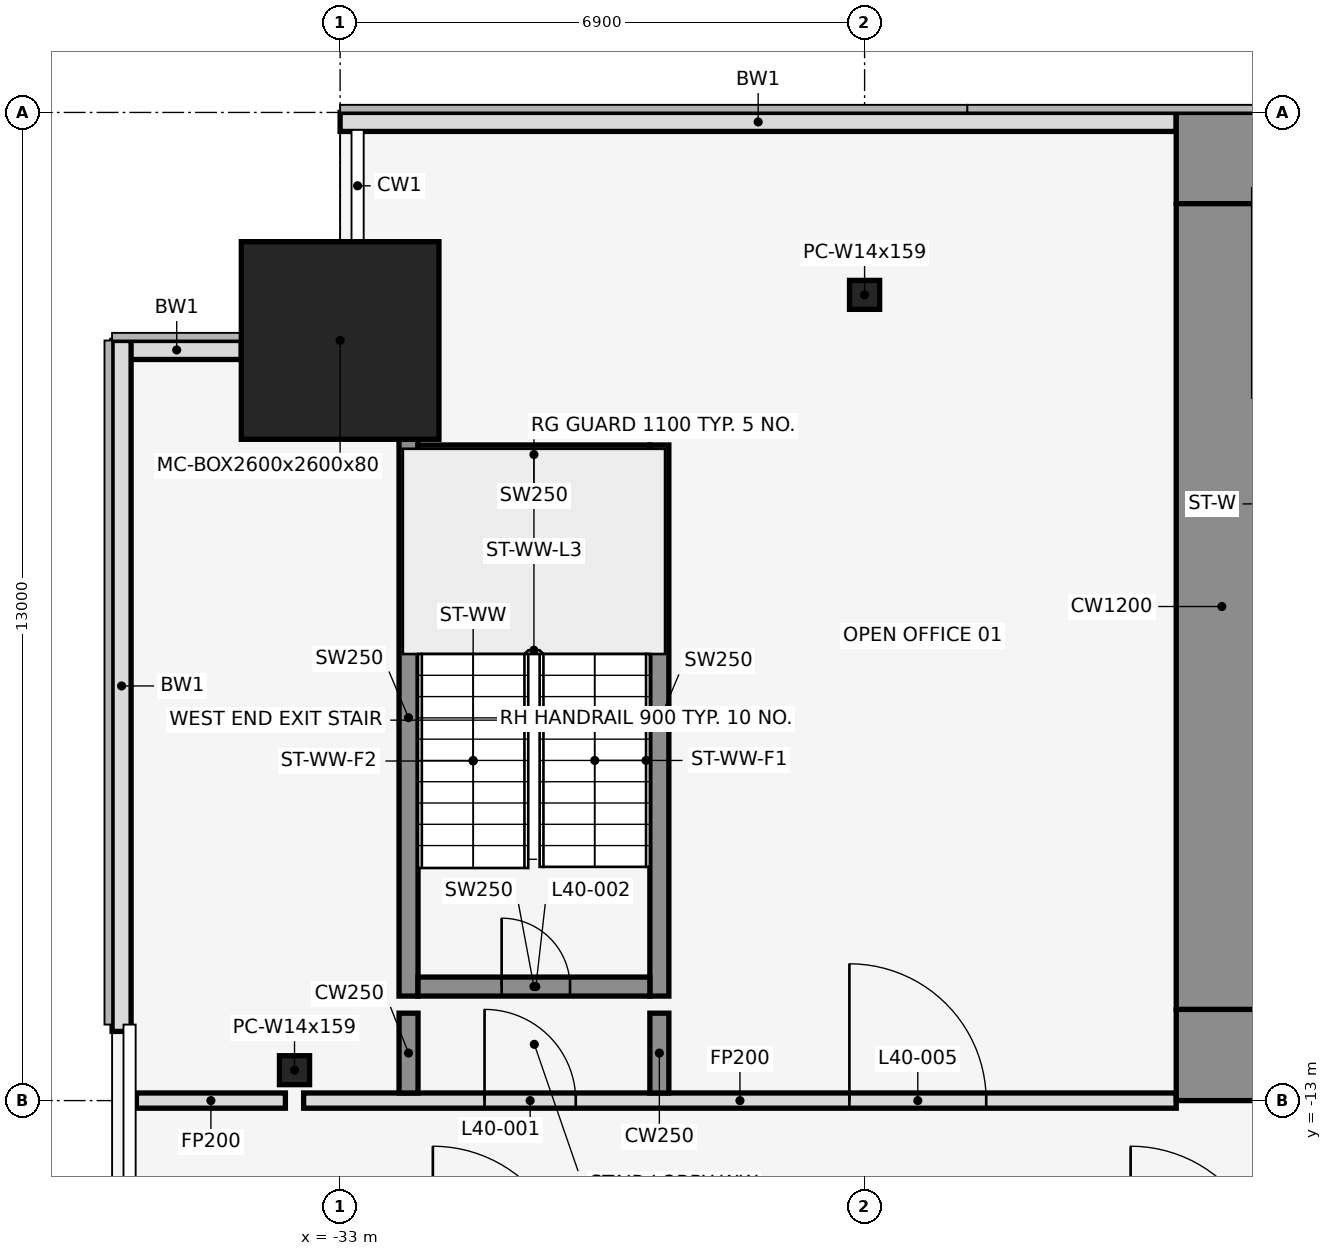
"""IFC4 building model, lengths in metres.
Left out: names, types, materials, properties, quantities, classifications, styles, units other than length and angle.
Written with IfcOpenShell. Run it as: python <this file> out.ifc"""

import sys

from ifc_helpers import new_model, si_unit, direction, frame, frame_2d, origin, origin_2d, place, context, subcontext, project, spatial, rectangle, hollow_rectangle, i_section, extrude, element, fill, save


model = new_model("IFC4")
c1 = context("Model", 3, precision=1e-05, world=origin(), true_north=direction((0.0, 1.0)))
c2 = subcontext(c1, "Body", "Model", "MODEL_VIEW")
j1 = project(units=[si_unit("LENGTHUNIT", "METRE"), si_unit("PLANEANGLEUNIT", "RADIAN")], contexts=[c1])
p1 = place(None, origin())
s1 = spatial("IfcSite", under=j1, at=p1, CompositionType="ELEMENT")
p2 = place(p1, origin())
s2 = spatial("IfcBuilding", under=s1, at=p2, CompositionType="ELEMENT")
p3 = place(p2, frame((0.0, 0.0, 181.4)))
s3 = spatial("IfcBuildingStorey", under=s2, at=p3, CompositionType="ELEMENT", Elevation=181.4)
p4 = place(p3, frame((-33.0, -3.0, 0.0), z_axis=(0.0, 0.0, 1.0), x_axis=(1.0, 0.0, 0.0)))
e1 = element("IfcColumn", 1, at=p4, inside=s3, PredefinedType="COLUMN", context=c2, shape_type="SweptSolid", body=[
    extrude(hollow_rectangle(XDim=2.6, YDim=2.6, WallThickness=0.08, at=origin_2d()), origin(), (0.0, 0.0, 1.0), 4.1),
])
for number, where, z_axis, x_axis in (
    (2, (-26.1, -2.4, 0.0), (0.0, 0.0, 1.0), (1.0, 0.0, 0.0)),
    (3, (-33.6, -12.6, 0.0), (0.0, 0.0, 1.0), (1.0, 0.0, 0.0)),
):
    element("IfcColumn", number, at=place(p3, frame(where, z_axis=z_axis, x_axis=x_axis)), inside=s3, PredefinedType="COLUMN", context=c2, shape_type="SweptSolid", body=[
        extrude(i_section(OverallWidth=0.396, OverallDepth=0.381, WebThickness=0.019, FlangeThickness=0.03, at=origin_2d()), origin(), (0.0, 0.0, 1.0), 4.1),
    ])
p5 = place(p3, frame((-22.0, -0.125, 0.0), z_axis=(0.0, 0.0, 1.0), x_axis=(-1.0, 0.0, 0.0)))
e4 = element("IfcWall", 4, at=p5, inside=s3, PredefinedType="STANDARD", context=c2, shape_type="SweptSolid", body=[
    extrude(rectangle(XDim=11.0, YDim=0.25, at=frame_2d((5.5, 0.0))), origin(), (0.0, 0.0, 1.0), 3.9),
])
p6 = place(p3, frame((-34.3, -3.125, 0.0), z_axis=(0.0, 0.0, 1.0), x_axis=(-1.0, 0.0, 0.0)))
e5 = element("IfcWall", 5, at=p6, inside=s3, PredefinedType="STANDARD", context=c2, shape_type="SweptSolid", body=[
    extrude(rectangle(XDim=1.7, YDim=0.25, at=frame_2d((0.85, 0.0))), origin(), (0.0, 0.0, 1.0), 3.9),
])
p7 = place(p3, frame((-35.875, -3.0, 0.0), z_axis=(0.0, 0.0, 1.0), x_axis=(0.0, -1.0, 0.0)))
e6 = element("IfcWall", 6, at=p7, inside=s3, PredefinedType="STANDARD", context=c2, shape_type="SweptSolid", body=[
    extrude(rectangle(XDim=9.09, YDim=0.25, at=frame_2d((4.545, 0.0))), origin(), (0.0, 0.0, 1.0), 3.9),
])
p8 = place(p3, frame((-32.1, -11.625, 0.0), z_axis=(0.0, 0.0, 1.0), x_axis=(0.0, 1.0, 0.0)))
e7 = element("IfcWall", 7, at=p8, inside=s3, PredefinedType="SHEAR", context=c2, shape_type="SweptSolid", body=[
    extrude(rectangle(XDim=7.325, YDim=0.25, at=frame_2d((3.663, 0.0))), origin(), (0.0, 0.0, 1.0), 4.1),
])
p9 = place(p3, frame((-28.8, -11.625, 0.0), z_axis=(0.0, 0.0, 1.0), x_axis=(0.0, 1.0, 0.0)))
e8 = element("IfcWall", 8, at=p9, inside=s3, PredefinedType="SHEAR", context=c2, shape_type="SweptSolid", body=[
    extrude(rectangle(XDim=7.25, YDim=0.25, at=frame_2d((3.625, 0.0))), origin(), (0.0, 0.0, 1.0), 4.1),
])
p10 = place(p3, frame((-31.975, -11.5, 0.0), z_axis=(0.0, 0.0, 1.0), x_axis=(1.0, 0.0, 0.0)))
e9 = element("IfcWall", 9, at=p10, inside=s3, PredefinedType="SHEAR", context=c2, shape_type="SweptSolid", body=[
    extrude(rectangle(XDim=3.05, YDim=0.25, at=frame_2d((1.525, 0.0))), origin(), (0.0, 0.0, 1.0), 4.1),
])
p11 = place(p10, frame((1.1, 0.0, 0.0)))
e10 = element("IfcOpeningElement", 10, at=p11, cuts=e9, PredefinedType="OPENING", context=c2, shape_type="SweptSolid", body=[
    extrude(rectangle(XDim=0.9, YDim=2.1, at=frame_2d((0.45, 1.05))), frame((0.0, 0.137, 0.0), z_axis=(0.0, -1.0, 0.0), x_axis=(1.0, 0.0, 0.0)), (0.0, 0.0, 1.0), 0.274),
])
p12 = place(p3, frame((-31.975, -4.5, 0.0), z_axis=(0.0, 0.0, 1.0), x_axis=(1.0, 0.0, 0.0)))
e11 = element("IfcWall", 11, at=p12, inside=s3, PredefinedType="SHEAR", context=c2, shape_type="SweptSolid", body=[
    extrude(rectangle(XDim=3.05, YDim=0.25, at=frame_2d((1.525, 0.0))), origin(), (0.0, 0.0, 1.0), 4.1),
])
p13 = place(p3, frame((-35.68, -13.0, 0.0), z_axis=(0.0, 0.0, 1.0), x_axis=(1.0, 0.0, 0.0)))
e12 = element("IfcWall", 12, at=p13, inside=s3, PredefinedType="PARTITIONING", context=c2, shape_type="SweptSolid", body=[
    extrude(rectangle(XDim=1.96, YDim=0.2, at=frame_2d((0.98, 0.0))), origin(), (0.0, 0.0, 1.0), 2.79),
])
p14 = place(p3, frame((-33.48, -13.0, 0.0), z_axis=(0.0, 0.0, 1.0), x_axis=(1.0, 0.0, 0.0)))
e13 = element("IfcWall", 13, at=p14, inside=s3, PredefinedType="PARTITIONING", context=c2, shape_type="SweptSolid", body=[
    extrude(rectangle(XDim=11.48, YDim=0.2, at=frame_2d((5.74, 0.0))), origin(), (0.0, 0.0, 1.0), 2.79),
])
p15 = place(p14, frame((2.38, 0.0, 0.0)))
e14 = element("IfcOpeningElement", 14, at=p15, cuts=e13, PredefinedType="OPENING", context=c2, shape_type="SweptSolid", body=[
    extrude(rectangle(XDim=1.2, YDim=2.1, at=frame_2d((0.6, 1.05))), frame((0.0, 0.112, 0.0), z_axis=(0.0, -1.0, 0.0), x_axis=(1.0, 0.0, 0.0)), (0.0, 0.0, 1.0), 0.224),
])
p16 = place(p14, frame((7.18, 0.0, 0.0)))
e15 = element("IfcOpeningElement", 15, at=p16, cuts=e13, PredefinedType="OPENING", context=c2, shape_type="SweptSolid", body=[
    extrude(rectangle(XDim=1.8, YDim=2.1, at=frame_2d((0.9, 1.05))), frame((0.0, 0.112, 0.0), z_axis=(0.0, -1.0, 0.0), x_axis=(1.0, 0.0, 0.0)), (0.0, 0.0, 1.0), 0.224),
])
for number, where, z_axis, x_axis in (
    (16, (-32.1, -12.9, 0.0), (0.0, 0.0, 1.0), (0.0, 1.0, 0.0)),
    (17, (-28.8, -12.9, 0.0), (0.0, 0.0, 1.0), (0.0, 1.0, 0.0)),
):
    element("IfcWall", number, at=place(p3, frame(where, z_axis=z_axis, x_axis=x_axis)), inside=s3, PredefinedType="SHEAR", context=c2, shape_type="SweptSolid", body=[
        extrude(rectangle(XDim=1.05, YDim=0.25, at=frame_2d((0.525, 0.0))), origin(), (0.0, 0.0, 1.0), 4.1),
    ])
p17 = place(p3, frame((-22.0, -0.6, 0.0), z_axis=(0.0, 0.0, 1.0), x_axis=(1.0, 0.0, 0.0)))
e18 = element("IfcWall", 18, at=p17, inside=s3, PredefinedType="SHEAR", context=c2, shape_type="SweptSolid", body=[
    extrude(rectangle(XDim=44.0, YDim=1.2, at=frame_2d((22.0, 0.0))), origin(), (0.0, 0.0, 1.0), 4.1),
])
p18 = place(p17, frame((18.55, 0.0, 0.0)))
e19 = element("IfcOpeningElement", 19, at=p18, cuts=e18, PredefinedType="OPENING", context=c2, shape_type="SweptSolid", body=[
    extrude(rectangle(XDim=0.9, YDim=2.1, at=frame_2d((0.45, 1.05))), frame((0.0, 0.612, 0.0), z_axis=(0.0, -1.0, 0.0), x_axis=(1.0, 0.0, 0.0)), (0.0, 0.0, 1.0), 1.224),
])
p19 = place(p17, frame((24.55, 0.0, 0.0)))
e20 = element("IfcOpeningElement", 20, at=p19, cuts=e18, PredefinedType="OPENING", context=c2, shape_type="SweptSolid", body=[
    extrude(rectangle(XDim=0.9, YDim=2.1, at=frame_2d((0.45, 1.05))), frame((0.0, 0.612, 0.0), z_axis=(0.0, -1.0, 0.0), x_axis=(1.0, 0.0, 0.0)), (0.0, 0.0, 1.0), 1.224),
])
p20 = place(p3, frame((-22.0, -12.4, 0.0), z_axis=(0.0, 0.0, 1.0), x_axis=(1.0, 0.0, 0.0)))
e21 = element("IfcWall", 21, at=p20, inside=s3, PredefinedType="SHEAR", context=c2, shape_type="SweptSolid", body=[
    extrude(rectangle(XDim=44.0, YDim=1.2, at=frame_2d((22.0, 0.0))), origin(), (0.0, 0.0, 1.0), 4.1),
])
p21 = place(p20, frame((2.2, 0.0, 0.0)))
e22 = element("IfcOpeningElement", 22, at=p21, cuts=e21, PredefinedType="OPENING", context=c2, shape_type="SweptSolid", body=[
    extrude(rectangle(XDim=1.2, YDim=2.1, at=frame_2d((0.6, 1.05))), frame((0.0, 0.612, 0.0), z_axis=(0.0, -1.0, 0.0), x_axis=(1.0, 0.0, 0.0)), (0.0, 0.0, 1.0), 1.224),
])
p22 = place(p20, frame((21.4, 0.0, 0.0)))
e23 = element("IfcOpeningElement", 23, at=p22, cuts=e21, PredefinedType="OPENING", context=c2, shape_type="SweptSolid", body=[
    extrude(rectangle(XDim=1.2, YDim=2.1, at=frame_2d((0.6, 1.05))), frame((0.0, 0.612, 0.0), z_axis=(0.0, -1.0, 0.0), x_axis=(1.0, 0.0, 0.0)), (0.0, 0.0, 1.0), 1.224),
])
p23 = place(p20, frame((40.6, 0.0, 0.0)))
e24 = element("IfcOpeningElement", 24, at=p23, cuts=e21, PredefinedType="OPENING", context=c2, shape_type="SweptSolid", body=[
    extrude(rectangle(XDim=1.2, YDim=2.1, at=frame_2d((0.6, 1.05))), frame((0.0, 0.612, 0.0), z_axis=(0.0, -1.0, 0.0), x_axis=(1.0, 0.0, 0.0)), (0.0, 0.0, 1.0), 1.224),
])
p24 = place(p20, frame((16.0, 0.0, 0.0)))
e25 = element("IfcOpeningElement", 25, at=p24, cuts=e21, PredefinedType="OPENING", context=c2, shape_type="SweptSolid", body=[
    extrude(rectangle(XDim=1.8, YDim=2.1, at=frame_2d((0.9, 1.05))), frame((0.0, 0.612, 0.0), z_axis=(0.0, -1.0, 0.0), x_axis=(1.0, 0.0, 0.0)), (0.0, 0.0, 1.0), 1.224),
])
p25 = place(p20, frame((6.3, 0.0, 0.0)))
e26 = element("IfcOpeningElement", 26, at=p25, cuts=e21, PredefinedType="OPENING", context=c2, shape_type="SweptSolid", body=[
    extrude(rectangle(XDim=1.2, YDim=2.1, at=frame_2d((0.6, 1.05))), frame((0.0, 0.612, 0.0), z_axis=(0.0, -1.0, 0.0), x_axis=(1.0, 0.0, 0.0)), (0.0, 0.0, 1.0), 1.224),
])
p26 = place(p20, frame((26.2, 0.0, 0.0)))
e27 = element("IfcOpeningElement", 27, at=p26, cuts=e21, PredefinedType="OPENING", context=c2, shape_type="SweptSolid", body=[
    extrude(rectangle(XDim=1.8, YDim=2.1, at=frame_2d((0.9, 1.05))), frame((0.0, 0.612, 0.0), z_axis=(0.0, -1.0, 0.0), x_axis=(1.0, 0.0, 0.0)), (0.0, 0.0, 1.0), 1.224),
])
p27 = place(p20, frame((36.5, 0.0, 0.0)))
e28 = element("IfcOpeningElement", 28, at=p27, cuts=e21, PredefinedType="OPENING", context=c2, shape_type="SweptSolid", body=[
    extrude(rectangle(XDim=1.2, YDim=2.1, at=frame_2d((0.6, 1.05))), frame((0.0, 0.612, 0.0), z_axis=(0.0, -1.0, 0.0), x_axis=(1.0, 0.0, 0.0)), (0.0, 0.0, 1.0), 1.224),
])
p28 = place(p3, frame((-21.4, -11.8, 0.0), z_axis=(0.0, 0.0, 1.0), x_axis=(0.0, 1.0, 0.0)))
e29 = element("IfcWall", 29, at=p28, inside=s3, PredefinedType="SHEAR", context=c2, shape_type="SweptSolid", body=[
    extrude(rectangle(XDim=10.6, YDim=1.2, at=frame_2d((5.3, 0.0))), origin(), (0.0, 0.0, 1.0), 4.1),
])
p29 = place(p15, origin())
e30 = element("IfcDoor", 30, at=p29, inside=s3, OperationType="SINGLE_SWING_LEFT", PredefinedType="DOOR", context=c2, shape_type="SweptSolid", body=[
    extrude(rectangle(XDim=1.2, YDim=2.1, at=frame_2d((0.6, 1.05))), frame((0.0, 0.025, 0.0), z_axis=(0.0, -1.0, 0.0), x_axis=(1.0, 0.0, 0.0)), (0.0, 0.0, 1.0), 0.05),
])
fill(e14, e30)
p30 = place(p11, origin())
e31 = element("IfcDoor", 31, at=p30, inside=s3, OperationType="SINGLE_SWING_LEFT", PredefinedType="DOOR", context=c2, shape_type="SweptSolid", body=[
    extrude(rectangle(XDim=0.9, YDim=2.1, at=frame_2d((0.45, 1.05))), frame((0.0, 0.025, 0.0), z_axis=(0.0, -1.0, 0.0), x_axis=(1.0, 0.0, 0.0)), (0.0, 0.0, 1.0), 0.05),
])
fill(e10, e31)
p31 = place(p16, origin())
e32 = element("IfcDoor", 32, at=p31, inside=s3, OperationType="SINGLE_SWING_LEFT", PredefinedType="DOOR", context=c2, shape_type="SweptSolid", body=[
    extrude(rectangle(XDim=1.8, YDim=2.1, at=frame_2d((0.9, 1.05))), frame((0.0, 0.025, 0.0), z_axis=(0.0, -1.0, 0.0), x_axis=(1.0, 0.0, 0.0)), (0.0, 0.0, 1.0), 0.05),
])
fill(e15, e32)
save(model, sys.argv[1])
